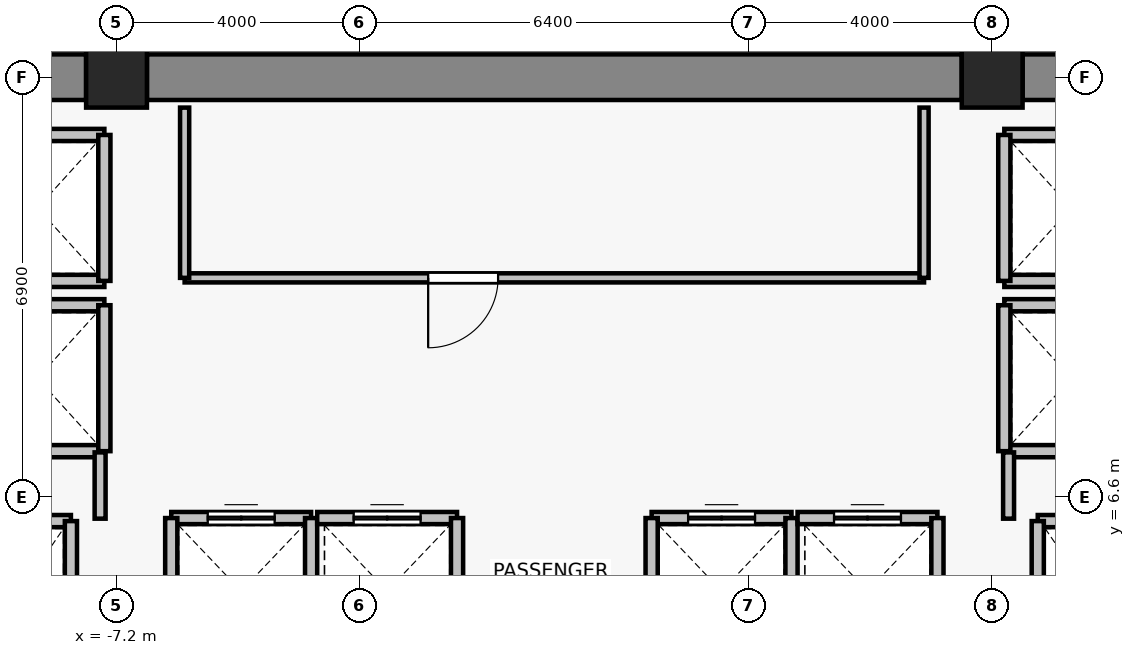
"""IFC4 building model, lengths in metres.
Left out: names, types, materials, properties, quantities, classifications, styles, units other than length and angle.
Written with IfcOpenShell. Run it as: python <this file> out.ifc"""

import sys

from ifc_helpers import new_model, si_unit, direction, frame, frame_2d, origin, origin_2d, place, context, subcontext, project, spatial, rectangle, extrude, source, transform, mapped, element, fill, save


model = new_model("IFC4")
c1 = context("Model", 3, precision=1e-05, world=origin(), true_north=direction((0.0, 1.0)))
c2 = subcontext(c1, "Body", "Model", "MODEL_VIEW")
j1 = project(units=[si_unit("LENGTHUNIT", "METRE"), si_unit("PLANEANGLEUNIT", "RADIAN")], contexts=[c1])
p1 = place(None, origin())
s1 = spatial("IfcSite", under=j1, at=p1, CompositionType="ELEMENT")
p2 = place(p1, origin())
s2 = spatial("IfcBuilding", under=s1, at=p2, CompositionType="ELEMENT")
p3 = place(p2, frame((0.0, 0.0, 185.8)))
s3 = spatial("IfcBuildingStorey", under=s2, at=p3, CompositionType="ELEMENT", Elevation=185.8)
for number, where, z_axis, x_axis in (
    (1, (-7.2, 13.5, 0.0), (0.0, 0.0, 1.0), (1.0, 0.0, 0.0)),
    (2, (7.2, 13.5, 0.0), (0.0, 0.0, 1.0), (1.0, 0.0, 0.0)),
):
    element("IfcColumn", number, at=place(p3, frame(where, z_axis=z_axis, x_axis=x_axis)), inside=s3, PredefinedType="COLUMN", context=c2, shape_type="SweptSolid", body=[
        extrude(rectangle(XDim=1.0, YDim=1.0, at=origin_2d()), origin(), (0.0, 0.0, 1.0), 3.3),
    ])
p4 = place(p3, frame((-13.9, 13.5, 0.0), z_axis=(0.0, 0.0, 1.0), x_axis=(1.0, 0.0, 0.0)))
e3 = element("IfcWall", 3, at=p4, inside=s3, PredefinedType="SHEAR", context=c2, shape_type="SweptSolid", body=[
    extrude(rectangle(XDim=6.2, YDim=0.75, at=frame_2d((3.1, 0.0))), origin(), (0.0, 0.0, 1.0), 3.075),
])
p5 = place(p3, frame((-6.7, 13.5, 0.0), z_axis=(0.0, 0.0, 1.0), x_axis=(1.0, 0.0, 0.0)))
e4 = element("IfcWall", 4, at=p5, inside=s3, PredefinedType="SHEAR", context=c2, shape_type="SweptSolid", body=[
    extrude(rectangle(XDim=13.4, YDim=0.75, at=frame_2d((6.7, 0.0))), origin(), (0.0, 0.0, 1.0), 3.075),
])
p6 = place(p3, frame((7.7, 13.5, 0.0), z_axis=(0.0, 0.0, 1.0), x_axis=(1.0, 0.0, 0.0)))
e5 = element("IfcWall", 5, at=p6, inside=s3, PredefinedType="SHEAR", context=c2, shape_type="SweptSolid", body=[
    extrude(rectangle(XDim=6.2, YDim=0.75, at=frame_2d((3.1, 0.0))), origin(), (0.0, 0.0, 1.0), 3.075),
])
p7 = place(p3, frame((-9.95, 6.2, 0.0), z_axis=(0.0, 0.0, 1.0), x_axis=(1.0, 0.0, 0.0)))
e6 = element("IfcWall", 6, at=p7, inside=s3, PredefinedType="SOLIDWALL", context=c2, shape_type="SweptSolid", body=[
    extrude(rectangle(XDim=2.0, YDim=0.2, at=frame_2d((1.0, 0.0))), origin(), (0.0, 0.0, 1.0), 3.075),
])
p8 = place(p3, frame((-7.95, 6.2, 0.0), z_axis=(0.0, 0.0, 1.0), x_axis=(0.0, -1.0, 0.0)))
e7 = element("IfcWall", 7, at=p8, inside=s3, PredefinedType="SOLIDWALL", context=c2, shape_type="SweptSolid", body=[
    extrude(rectangle(XDim=2.8, YDim=0.2, at=frame_2d((1.4, 0.0))), origin(), (0.0, 0.0, 1.0), 3.075),
])
p9 = place(p3, frame((7.95, 6.2, 0.0), z_axis=(0.0, 0.0, 1.0), x_axis=(1.0, 0.0, 0.0)))
e8 = element("IfcWall", 8, at=p9, inside=s3, PredefinedType="SOLIDWALL", context=c2, shape_type="SweptSolid", body=[
    extrude(rectangle(XDim=2.0, YDim=0.2, at=frame_2d((1.0, 0.0))), origin(), (0.0, 0.0, 1.0), 3.075),
])
p10 = place(p3, frame((7.95, 3.4, 0.0), z_axis=(0.0, 0.0, 1.0), x_axis=(0.0, 1.0, 0.0)))
e9 = element("IfcWall", 9, at=p10, inside=s3, PredefinedType="SOLIDWALL", context=c2, shape_type="SweptSolid", body=[
    extrude(rectangle(XDim=2.8, YDim=0.2, at=frame_2d((1.4, 0.0))), origin(), (0.0, 0.0, 1.0), 3.075),
])
p11 = place(p3, frame((-6.3, 6.25, 0.0), z_axis=(0.0, 0.0, 1.0), x_axis=(1.0, 0.0, 0.0)))
e10 = element("IfcWall", 10, at=p11, inside=s3, PredefinedType="SOLIDWALL", context=c2, shape_type="SweptSolid", body=[
    extrude(rectangle(XDim=2.3, YDim=0.2, at=frame_2d((1.15, 0.0))), origin(), (0.0, 0.0, 1.0), 3.075),
])
p12 = place(p11, frame((0.6, 0.0, 0.0)))
e11 = element("IfcOpeningElement", 11, at=p12, cuts=e10, PredefinedType="OPENING", context=c2, shape_type="SweptSolid", body=[
    extrude(rectangle(XDim=1.1, YDim=2.2, at=frame_2d((0.55, 1.1))), frame((0.0, 0.11, 0.0), z_axis=(0.0, -1.0, 0.0), x_axis=(1.0, 0.0, 0.0)), (0.0, 0.0, 1.0), 0.22),
])
for number, where, z_axis, x_axis in (
    (12, (-6.3, 3.85, 0.0), (0.0, 0.0, 1.0), (0.0, 1.0, 0.0)),
    (13, (-4.0, 6.25, 0.0), (0.0, 0.0, 1.0), (0.0, -1.0, 0.0)),
):
    element("IfcWall", number, at=place(p3, frame(where, z_axis=z_axis, x_axis=x_axis)), inside=s3, PredefinedType="SOLIDWALL", context=c2, shape_type="SweptSolid", body=[
        extrude(rectangle(XDim=2.4, YDim=0.2, at=frame_2d((1.2, 0.0))), origin(), (0.0, 0.0, 1.0), 3.075),
    ])
p13 = place(p3, frame((-3.9, 6.25, 0.0), z_axis=(0.0, 0.0, 1.0), x_axis=(1.0, 0.0, 0.0)))
e14 = element("IfcWall", 14, at=p13, inside=s3, PredefinedType="SOLIDWALL", context=c2, shape_type="SweptSolid", body=[
    extrude(rectangle(XDim=2.3, YDim=0.2, at=frame_2d((1.15, 0.0))), origin(), (0.0, 0.0, 1.0), 3.075),
])
p14 = place(p13, frame((0.6, 0.0, 0.0)))
e15 = element("IfcOpeningElement", 15, at=p14, cuts=e14, PredefinedType="OPENING", context=c2, shape_type="SweptSolid", body=[
    extrude(rectangle(XDim=1.1, YDim=2.2, at=frame_2d((0.55, 1.1))), frame((0.0, 0.11, 0.0), z_axis=(0.0, -1.0, 0.0), x_axis=(1.0, 0.0, 0.0)), (0.0, 0.0, 1.0), 0.22),
])
p15 = place(p3, frame((-1.6, 6.25, 0.0), z_axis=(0.0, 0.0, 1.0), x_axis=(0.0, -1.0, 0.0)))
e16 = element("IfcWall", 16, at=p15, inside=s3, PredefinedType="SOLIDWALL", context=c2, shape_type="SweptSolid", body=[
    extrude(rectangle(XDim=2.4, YDim=0.2, at=frame_2d((1.2, 0.0))), origin(), (0.0, 0.0, 1.0), 3.075),
])
p16 = place(p3, frame((1.6, 6.25, 0.0), z_axis=(0.0, 0.0, 1.0), x_axis=(1.0, 0.0, 0.0)))
e17 = element("IfcWall", 17, at=p16, inside=s3, PredefinedType="SOLIDWALL", context=c2, shape_type="SweptSolid", body=[
    extrude(rectangle(XDim=2.3, YDim=0.2, at=frame_2d((1.15, 0.0))), origin(), (0.0, 0.0, 1.0), 3.075),
])
p17 = place(p16, frame((0.6, 0.0, 0.0)))
e18 = element("IfcOpeningElement", 18, at=p17, cuts=e17, PredefinedType="OPENING", context=c2, shape_type="SweptSolid", body=[
    extrude(rectangle(XDim=1.1, YDim=2.2, at=frame_2d((0.55, 1.1))), frame((0.0, 0.11, 0.0), z_axis=(0.0, -1.0, 0.0), x_axis=(1.0, 0.0, 0.0)), (0.0, 0.0, 1.0), 0.22),
])
for number, where, z_axis, x_axis in (
    (19, (1.6, 3.85, 0.0), (0.0, 0.0, 1.0), (0.0, 1.0, 0.0)),
    (20, (3.9, 6.25, 0.0), (0.0, 0.0, 1.0), (0.0, -1.0, 0.0)),
):
    element("IfcWall", number, at=place(p3, frame(where, z_axis=z_axis, x_axis=x_axis)), inside=s3, PredefinedType="SOLIDWALL", context=c2, shape_type="SweptSolid", body=[
        extrude(rectangle(XDim=2.4, YDim=0.2, at=frame_2d((1.2, 0.0))), origin(), (0.0, 0.0, 1.0), 3.075),
    ])
p18 = place(p3, frame((4.0, 6.25, 0.0), z_axis=(0.0, 0.0, 1.0), x_axis=(1.0, 0.0, 0.0)))
e21 = element("IfcWall", 21, at=p18, inside=s3, PredefinedType="SOLIDWALL", context=c2, shape_type="SweptSolid", body=[
    extrude(rectangle(XDim=2.3, YDim=0.2, at=frame_2d((1.15, 0.0))), origin(), (0.0, 0.0, 1.0), 3.075),
])
p19 = place(p18, frame((0.6, 0.0, 0.0)))
e22 = element("IfcOpeningElement", 22, at=p19, cuts=e21, PredefinedType="OPENING", context=c2, shape_type="SweptSolid", body=[
    extrude(rectangle(XDim=1.1, YDim=2.2, at=frame_2d((0.55, 1.1))), frame((0.0, 0.11, 0.0), z_axis=(0.0, -1.0, 0.0), x_axis=(1.0, 0.0, 0.0)), (0.0, 0.0, 1.0), 0.22),
])
p20 = place(p3, frame((6.3, 6.25, 0.0), z_axis=(0.0, 0.0, 1.0), x_axis=(0.0, -1.0, 0.0)))
e23 = element("IfcWall", 23, at=p20, inside=s3, PredefinedType="SOLIDWALL", context=c2, shape_type="SweptSolid", body=[
    extrude(rectangle(XDim=2.4, YDim=0.2, at=frame_2d((1.2, 0.0))), origin(), (0.0, 0.0, 1.0), 3.075),
])
for number, where, z_axis, x_axis in (
    (24, (-7.4, 7.35, 0.0), (0.0, 0.0, 1.0), (-1.0, 0.0, 0.0)),
    (25, (-9.6, 9.75, 0.0), (0.0, 0.0, 1.0), (1.0, 0.0, 0.0)),
):
    element("IfcWall", number, at=place(p3, frame(where, z_axis=z_axis, x_axis=x_axis)), inside=s3, PredefinedType="SOLIDWALL", context=c2, shape_type="SweptSolid", body=[
        extrude(rectangle(XDim=2.2, YDim=0.2, at=frame_2d((1.1, 0.0))), origin(), (0.0, 0.0, 1.0), 2.565),
    ])
p21 = place(p3, frame((-7.4, 9.75, 0.0), z_axis=(0.0, 0.0, 1.0), x_axis=(0.0, -1.0, 0.0)))
e26 = element("IfcWall", 26, at=p21, inside=s3, PredefinedType="SOLIDWALL", context=c2, shape_type="SweptSolid", body=[
    extrude(rectangle(XDim=2.4, YDim=0.2, at=frame_2d((1.2, 0.0))), origin(), (0.0, 0.0, 1.0), 2.565),
])
for number, where, z_axis, x_axis in (
    (27, (-7.4, 10.15, 0.0), (0.0, 0.0, 1.0), (-1.0, 0.0, 0.0)),
    (28, (-9.6, 12.55, 0.0), (0.0, 0.0, 1.0), (1.0, 0.0, 0.0)),
):
    element("IfcWall", number, at=place(p3, frame(where, z_axis=z_axis, x_axis=x_axis)), inside=s3, PredefinedType="SOLIDWALL", context=c2, shape_type="SweptSolid", body=[
        extrude(rectangle(XDim=2.2, YDim=0.2, at=frame_2d((1.1, 0.0))), origin(), (0.0, 0.0, 1.0), 2.565),
    ])
p22 = place(p3, frame((-7.4, 12.55, 0.0), z_axis=(0.0, 0.0, 1.0), x_axis=(0.0, -1.0, 0.0)))
e29 = element("IfcWall", 29, at=p22, inside=s3, PredefinedType="SOLIDWALL", context=c2, shape_type="SweptSolid", body=[
    extrude(rectangle(XDim=2.4, YDim=0.2, at=frame_2d((1.2, 0.0))), origin(), (0.0, 0.0, 1.0), 2.565),
])
for number, where, z_axis, x_axis in (
    (30, (9.6, 7.35, 0.0), (0.0, 0.0, 1.0), (-1.0, 0.0, 0.0)),
    (31, (7.4, 9.75, 0.0), (0.0, 0.0, 1.0), (1.0, 0.0, 0.0)),
):
    element("IfcWall", number, at=place(p3, frame(where, z_axis=z_axis, x_axis=x_axis)), inside=s3, PredefinedType="SOLIDWALL", context=c2, shape_type="SweptSolid", body=[
        extrude(rectangle(XDim=2.2, YDim=0.2, at=frame_2d((1.1, 0.0))), origin(), (0.0, 0.0, 1.0), 2.565),
    ])
p23 = place(p3, frame((7.4, 7.35, 0.0), z_axis=(0.0, 0.0, 1.0), x_axis=(0.0, 1.0, 0.0)))
e32 = element("IfcWall", 32, at=p23, inside=s3, PredefinedType="SOLIDWALL", context=c2, shape_type="SweptSolid", body=[
    extrude(rectangle(XDim=2.4, YDim=0.2, at=frame_2d((1.2, 0.0))), origin(), (0.0, 0.0, 1.0), 2.565),
])
for number, where, z_axis, x_axis in (
    (33, (9.6, 10.15, 0.0), (0.0, 0.0, 1.0), (-1.0, 0.0, 0.0)),
    (34, (7.4, 12.55, 0.0), (0.0, 0.0, 1.0), (1.0, 0.0, 0.0)),
):
    element("IfcWall", number, at=place(p3, frame(where, z_axis=z_axis, x_axis=x_axis)), inside=s3, PredefinedType="SOLIDWALL", context=c2, shape_type="SweptSolid", body=[
        extrude(rectangle(XDim=2.2, YDim=0.2, at=frame_2d((1.1, 0.0))), origin(), (0.0, 0.0, 1.0), 2.565),
    ])
p24 = place(p3, frame((7.4, 10.15, 0.0), z_axis=(0.0, 0.0, 1.0), x_axis=(0.0, 1.0, 0.0)))
e35 = element("IfcWall", 35, at=p24, inside=s3, PredefinedType="SOLIDWALL", context=c2, shape_type="SweptSolid", body=[
    extrude(rectangle(XDim=2.4, YDim=0.2, at=frame_2d((1.2, 0.0))), origin(), (0.0, 0.0, 1.0), 2.565),
])
for number, where, z_axis, x_axis in (
    (36, (-7.47, 7.33, 0.0), (0.0, 0.0, 1.0), (0.0, -1.0, 0.0)),
    (37, (7.47, 6.24, 0.0), (0.0, 0.0, 1.0), (0.0, 1.0, 0.0)),
):
    element("IfcWall", number, at=place(p3, frame(where, z_axis=z_axis, x_axis=x_axis)), inside=s3, PredefinedType="PARTITIONING", context=c2, shape_type="SweptSolid", body=[
        extrude(rectangle(XDim=1.09, YDim=0.18, at=frame_2d((0.545, 0.0))), origin(), (0.0, 0.0, 1.0), 2.565),
    ])
p25 = place(p3, frame((6.08, 10.2, 0.0), z_axis=(0.0, 0.0, 1.0), x_axis=(-1.0, 0.0, 0.0)))
e38 = element("IfcWall", 38, at=p25, inside=s3, PredefinedType="PARTITIONING", context=c2, shape_type="SweptSolid", body=[
    extrude(rectangle(XDim=12.16, YDim=0.15, at=frame_2d((6.08, 0.0))), origin(), (0.0, 0.0, 1.0), 3.075),
])
p26 = place(p25, frame((7.005, 0.0, 0.0)))
e39 = element("IfcOpeningElement", 39, at=p26, cuts=e38, PredefinedType="OPENING", context=c2, shape_type="SweptSolid", body=[
    extrude(rectangle(XDim=1.15, YDim=2.15, at=frame_2d((0.575, 1.075))), frame((0.0, 0.085, 0.0), z_axis=(0.0, -1.0, 0.0), x_axis=(1.0, 0.0, 0.0)), (0.0, 0.0, 1.0), 0.17),
])
for number, where, z_axis, x_axis in (
    (40, (-6.08, 10.2, 0.0), (0.0, 0.0, 1.0), (0.0, 1.0, 0.0)),
    (41, (6.08, 13.0, 0.0), (0.0, 0.0, 1.0), (0.0, -1.0, 0.0)),
):
    element("IfcWall", number, at=place(p3, frame(where, z_axis=z_axis, x_axis=x_axis)), inside=s3, PredefinedType="PARTITIONING", context=c2, shape_type="SweptSolid", body=[
        extrude(rectangle(XDim=2.8, YDim=0.15, at=frame_2d((1.4, 0.0))), origin(), (0.0, 0.0, 1.0), 3.075),
    ])
m1 = source(origin(), c2, "Body", "SweptSolid", [
    extrude(rectangle(XDim=1.1, YDim=2.2, at=frame_2d((0.55, 1.1))), frame((0.0, 0.025, 0.0), z_axis=(0.0, -1.0, 0.0), x_axis=(1.0, 0.0, 0.0)), (0.0, 0.0, 1.0), 0.05),
])
p27 = place(p12, origin())
e42 = element("IfcDoor", 42, at=p27, inside=s3, OperationType="DOUBLE_DOOR_SLIDING", PredefinedType="DOOR", context=c2, shape_type="MappedRepresentation", body=[
    mapped(m1, transform((0.0, 0.0, 0.0), x_axis=(1.0, 0.0, 0.0), y_axis=(0.0, 1.0, 0.0), z_axis=(0.0, 0.0, 1.0), scale=1.0)),
])
fill(e11, e42)
p28 = place(p14, origin())
e43 = element("IfcDoor", 43, at=p28, inside=s3, OperationType="DOUBLE_DOOR_SLIDING", PredefinedType="DOOR", context=c2, shape_type="MappedRepresentation", body=[
    mapped(m1, transform((0.0, 0.0, 0.0), x_axis=(1.0, 0.0, 0.0), y_axis=(0.0, 1.0, 0.0), z_axis=(0.0, 0.0, 1.0), scale=1.0)),
])
fill(e15, e43)
p29 = place(p17, origin())
e44 = element("IfcDoor", 44, at=p29, inside=s3, OperationType="DOUBLE_DOOR_SLIDING", PredefinedType="DOOR", context=c2, shape_type="MappedRepresentation", body=[
    mapped(m1, transform((0.0, 0.0, 0.0), x_axis=(1.0, 0.0, 0.0), y_axis=(0.0, 1.0, 0.0), z_axis=(0.0, 0.0, 1.0), scale=1.0)),
])
fill(e18, e44)
p30 = place(p19, origin())
e45 = element("IfcDoor", 45, at=p30, inside=s3, OperationType="DOUBLE_DOOR_SLIDING", PredefinedType="DOOR", context=c2, shape_type="MappedRepresentation", body=[
    mapped(m1, transform((0.0, 0.0, 0.0), x_axis=(1.0, 0.0, 0.0), y_axis=(0.0, 1.0, 0.0), z_axis=(0.0, 0.0, 1.0), scale=1.0)),
])
fill(e22, e45)
m2 = source(origin(), c2, "Body", "SweptSolid", [
    extrude(rectangle(XDim=1.15, YDim=2.15, at=frame_2d((0.575, 1.075))), frame((0.0, 0.025, 0.0), z_axis=(0.0, -1.0, 0.0), x_axis=(1.0, 0.0, 0.0)), (0.0, 0.0, 1.0), 0.05),
])
p31 = place(p26, origin())
e46 = element("IfcDoor", 46, at=p31, inside=s3, OperationType="SINGLE_SWING_RIGHT", PredefinedType="DOOR", context=c2, shape_type="MappedRepresentation", body=[
    mapped(m2, transform((0.0, 0.0, 0.0), x_axis=(1.0, 0.0, 0.0), y_axis=(0.0, 1.0, 0.0), z_axis=(0.0, 0.0, 1.0), scale=1.0)),
])
fill(e39, e46)
save(model, sys.argv[1])
